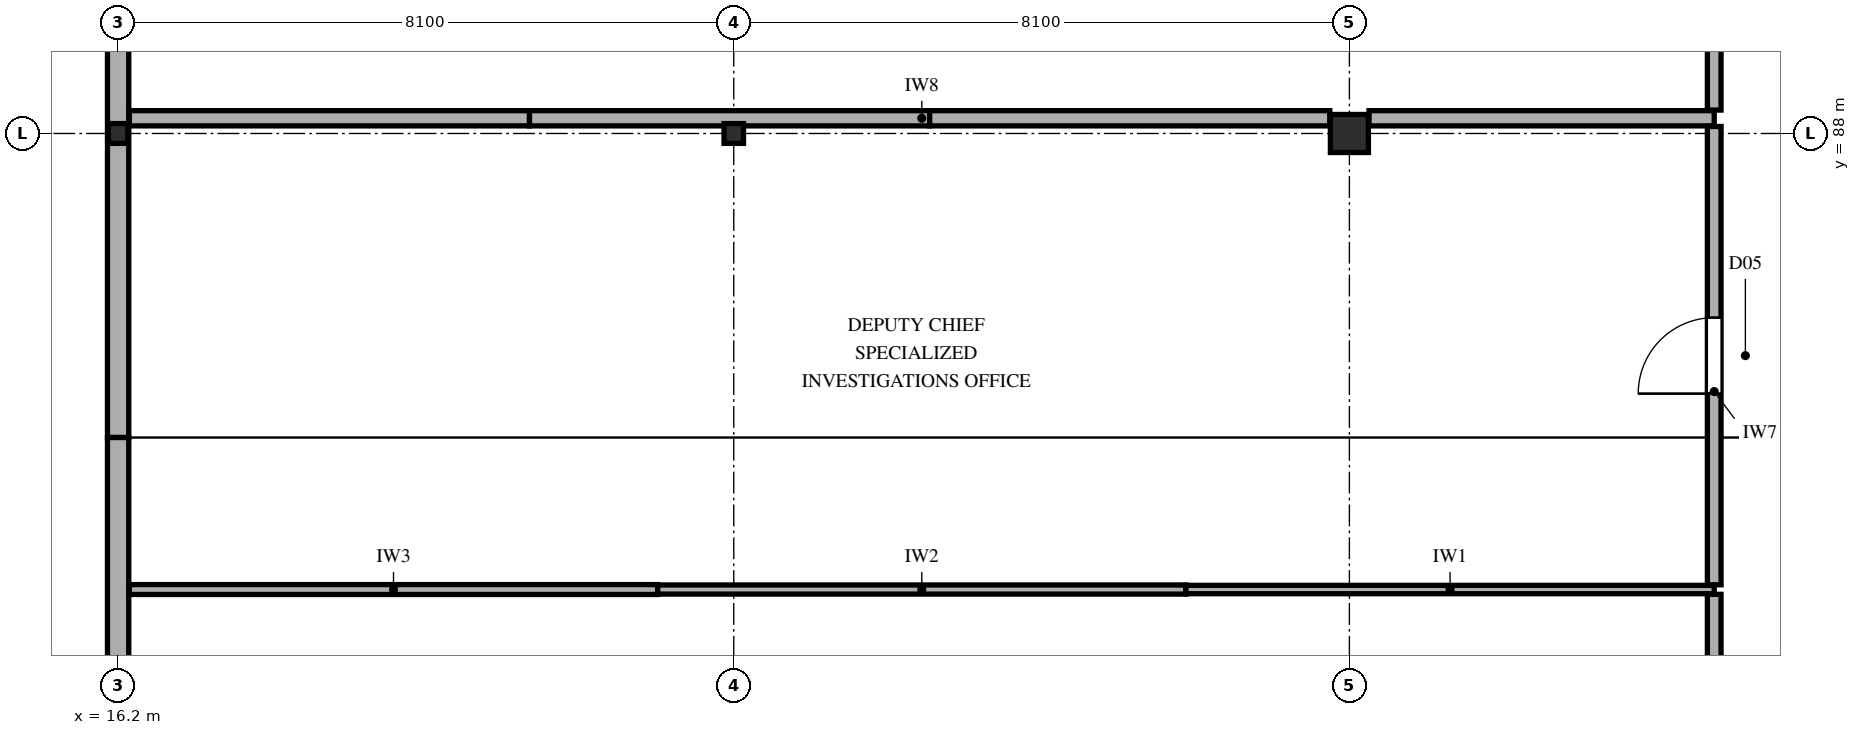
"""IFC4 building model, lengths in metres.
Left out: names, types, materials, properties, quantities, classifications, styles, units other than length and angle.
Written with IfcOpenShell. Run it as: python <this file> out.ifc"""

import sys

from ifc_helpers import new_model, si_unit, direction, frame, frame_2d, origin, origin_2d, place, context, subcontext, project, spatial, rectangle, i_section, extrude, element, fill, save


model = new_model("IFC4")
c1 = context("Model", 3, precision=1e-05, world=origin(), true_north=direction((0.0, 1.0)))
c2 = subcontext(c1, "Body", "Model", "MODEL_VIEW")
j1 = project(units=[si_unit("LENGTHUNIT", "METRE"), si_unit("PLANEANGLEUNIT", "RADIAN")], contexts=[c1])
p1 = place(None, origin())
s1 = spatial("IfcSite", under=j1, at=p1, CompositionType="ELEMENT")
p2 = place(p1, origin())
s2 = spatial("IfcBuilding", under=s1, at=p2, CompositionType="ELEMENT")
p3 = place(p2, frame((0.0, 0.0, 33.3)))
s3 = spatial("IfcBuildingStorey", under=s2, at=p3, CompositionType="ELEMENT", Elevation=33.3)
for number, where, z_axis, x_axis in (
    (1, (16.2, 88.0, 0.0), (0.0, 0.0, 1.0), (1.0, 0.0, 0.0)),
    (2, (24.3, 88.0, 0.0), (0.0, 0.0, 1.0), (1.0, 0.0, 0.0)),
):
    element("IfcColumn", number, at=place(p3, frame(where, z_axis=z_axis, x_axis=x_axis)), inside=s3, PredefinedType="COLUMN", context=c2, shape_type="SweptSolid", body=[
        extrude(i_section(OverallWidth=0.256, OverallDepth=0.26, WebThickness=0.011, FlangeThickness=0.017, FilletRadius=0.013, at=origin_2d()), origin(), (0.0, 0.0, 1.0), 3.98),
    ])
p4 = place(p3, frame((32.4, 88.0, 0.0), z_axis=(0.0, 0.0, 1.0), x_axis=(1.0, 0.0, 0.0)))
e3 = element("IfcColumn", 3, at=p4, inside=s3, PredefinedType="COLUMN", context=c2, shape_type="SweptSolid", body=[
    extrude(rectangle(XDim=0.5, YDim=0.5, at=origin_2d()), origin(), (0.0, 0.0, 1.0), 3.98),
])
p5 = place(p3, frame((16.2, 98.0, 0.0), z_axis=(0.0, 0.0, 1.0), x_axis=(0.0, -1.0, 0.0)))
e4 = element("IfcWall", 4, at=p5, inside=s3, PredefinedType="SOLIDWALL", context=c2, shape_type="SweptSolid", body=[
    extrude(rectangle(XDim=14.0, YDim=0.28, at=frame_2d((7.0, 0.0))), origin(), (0.0, 0.0, 1.0), 3.655),
])
p6 = place(p5, frame((6.3, 0.0, 0.95)))
e5 = element("IfcOpeningElement", 5, at=p6, cuts=e4, PredefinedType="OPENING", context=c2, shape_type="SweptSolid", body=[
    extrude(rectangle(XDim=1.8, YDim=1.5, at=frame_2d((0.9, 0.75))), frame((0.0, 0.15, 0.0), z_axis=(0.0, -1.0, 0.0), x_axis=(1.0, 0.0, 0.0)), (0.0, 0.0, 1.0), 0.3),
])
p7 = place(p3, frame((16.2, 84.0, 0.0), z_axis=(0.0, 0.0, 1.0), x_axis=(0.0, -1.0, 0.0)))
e6 = element("IfcWall", 6, at=p7, inside=s3, PredefinedType="SOLIDWALL", context=c2, shape_type="SweptSolid", body=[
    extrude(rectangle(XDim=14.0, YDim=0.28, at=frame_2d((7.0, 0.0))), origin(), (0.0, 0.0, 1.0), 3.655),
])
p8 = place(p3, frame((16.348, 82.0, 0.0), z_axis=(0.0, 0.0, 1.0), x_axis=(1.0, 0.0, 0.0)))
e7 = element("IfcWall", 7, at=p8, inside=s3, PredefinedType="PARTITIONING", context=c2, shape_type="SweptSolid", body=[
    extrude(rectangle(XDim=6.951, YDim=0.13, at=frame_2d((3.475, 0.0))), origin(), (0.0, 0.0, 1.0), 3.98),
])
p9 = place(p3, frame((23.299, 82.0, 0.0), z_axis=(0.0, 0.0, 1.0), x_axis=(1.0, 0.0, 0.0)))
e8 = element("IfcWall", 8, at=p9, inside=s3, PredefinedType="PARTITIONING", context=c2, shape_type="SweptSolid", body=[
    extrude(rectangle(XDim=6.951, YDim=0.12, at=frame_2d((3.475, 0.0))), origin(), (0.0, 0.0, 1.0), 3.98),
])
p10 = place(p3, frame((30.249, 82.0, 0.0), z_axis=(0.0, 0.0, 1.0), x_axis=(1.0, 0.0, 0.0)))
e9 = element("IfcWall", 9, at=p10, inside=s3, PredefinedType="PARTITIONING", context=c2, shape_type="SweptSolid", body=[
    extrude(rectangle(XDim=6.951, YDim=0.11, at=frame_2d((3.475, 0.0))), origin(), (0.0, 0.0, 1.0), 3.98),
])
p11 = place(p3, frame((16.348, 88.2, 0.0), z_axis=(0.0, 0.0, 1.0), x_axis=(1.0, 0.0, 0.0)))
e10 = element("IfcWall", 10, at=p11, inside=s3, PredefinedType="PARTITIONING", context=c2, shape_type="SweptSolid", body=[
    extrude(rectangle(XDim=5.265, YDim=0.2, at=frame_2d((2.632, 0.0))), origin(), (0.0, 0.0, 1.0), 3.655),
])
p12 = place(p3, frame((21.613, 88.2, 0.0), z_axis=(0.0, 0.0, 1.0), x_axis=(1.0, 0.0, 0.0)))
e11 = element("IfcWall", 11, at=p12, inside=s3, PredefinedType="PARTITIONING", context=c2, shape_type="SweptSolid", body=[
    extrude(rectangle(XDim=5.265, YDim=0.2, at=frame_2d((2.632, 0.0))), origin(), (0.0, 0.0, 1.0), 3.655),
])
p13 = place(p3, frame((26.877, 88.2, 0.0), z_axis=(0.0, 0.0, 1.0), x_axis=(1.0, 0.0, 0.0)))
e12 = element("IfcWall", 12, at=p13, inside=s3, PredefinedType="PARTITIONING", context=c2, shape_type="SweptSolid", body=[
    extrude(rectangle(XDim=5.265, YDim=0.2, at=frame_2d((2.632, 0.0))), origin(), (0.0, 0.0, 1.0), 3.655),
])
p14 = place(p3, frame((32.658, 88.2, 0.0), z_axis=(0.0, 0.0, 1.0), x_axis=(1.0, 0.0, 0.0)))
e13 = element("IfcWall", 13, at=p14, inside=s3, PredefinedType="PARTITIONING", context=c2, shape_type="SweptSolid", body=[
    extrude(rectangle(XDim=4.542, YDim=0.2, at=frame_2d((2.271, 0.0))), origin(), (0.0, 0.0, 1.0), 3.655),
])
p15 = place(p3, frame((37.2, 75.608, 0.0), z_axis=(0.0, 0.0, 1.0), x_axis=(0.0, 1.0, 0.0)))
e14 = element("IfcWall", 14, at=p15, inside=s3, PredefinedType="PARTITIONING", context=c2, shape_type="SweptSolid", body=[
    extrude(rectangle(XDim=6.329, YDim=0.18, at=frame_2d((3.165, 0.0))), origin(), (0.0, 0.0, 1.0), 3.98),
])
p16 = place(p15, frame((2.665, 0.0, 0.0)))
e15 = element("IfcOpeningElement", 15, at=p16, cuts=e14, PredefinedType="OPENING", context=c2, shape_type="SweptSolid", body=[
    extrude(rectangle(XDim=1.0, YDim=2.2, at=frame_2d((0.5, 1.1))), frame((0.0, 0.1, 0.0), z_axis=(0.0, -1.0, 0.0), x_axis=(1.0, 0.0, 0.0)), (0.0, 0.0, 1.0), 0.2),
])
p17 = place(p3, frame((37.2, 82.063, 0.0), z_axis=(0.0, 0.0, 1.0), x_axis=(0.0, 1.0, 0.0)))
e16 = element("IfcWall", 16, at=p17, inside=s3, PredefinedType="PARTITIONING", context=c2, shape_type="SweptSolid", body=[
    extrude(rectangle(XDim=6.029, YDim=0.18, at=frame_2d((3.015, 0.0))), origin(), (0.0, 0.0, 1.0), 3.98),
])
p18 = place(p17, frame((2.514, 0.0, 0.0)))
e17 = element("IfcOpeningElement", 17, at=p18, cuts=e16, PredefinedType="OPENING", context=c2, shape_type="SweptSolid", body=[
    extrude(rectangle(XDim=1.0, YDim=2.2, at=frame_2d((0.5, 1.1))), frame((0.0, 0.1, 0.0), z_axis=(0.0, -1.0, 0.0), x_axis=(1.0, 0.0, 0.0)), (0.0, 0.0, 1.0), 0.2),
])
p19 = place(p3, frame((37.2, 88.308, 0.0), z_axis=(0.0, 0.0, 1.0), x_axis=(0.0, 1.0, 0.0)))
e18 = element("IfcWall", 18, at=p19, inside=s3, PredefinedType="PARTITIONING", context=c2, shape_type="SweptSolid", body=[
    extrude(rectangle(XDim=4.384, YDim=0.18, at=frame_2d((2.192, 0.0))), origin(), (0.0, 0.0, 1.0), 3.98),
])
p20 = place(p19, frame((1.642, 0.0, 0.0)))
e19 = element("IfcOpeningElement", 19, at=p20, cuts=e18, PredefinedType="OPENING", context=c2, shape_type="SweptSolid", body=[
    extrude(rectangle(XDim=1.1, YDim=2.2, at=frame_2d((0.55, 1.1))), frame((0.0, 0.1, 0.0), z_axis=(0.0, -1.0, 0.0), x_axis=(1.0, 0.0, 0.0)), (0.0, 0.0, 1.0), 0.2),
])
p21 = place(p18, origin())
e20 = element("IfcDoor", 20, at=p21, inside=s3, OperationType="SINGLE_SWING_LEFT", PredefinedType="DOOR", context=c2, shape_type="SweptSolid", body=[
    extrude(rectangle(XDim=1.0, YDim=2.2, at=frame_2d((0.5, 1.1))), frame((0.0, 0.025, 0.0), z_axis=(0.0, -1.0, 0.0), x_axis=(1.0, 0.0, 0.0)), (0.0, 0.0, 1.0), 0.05),
])
fill(e17, e20)
save(model, sys.argv[1])
